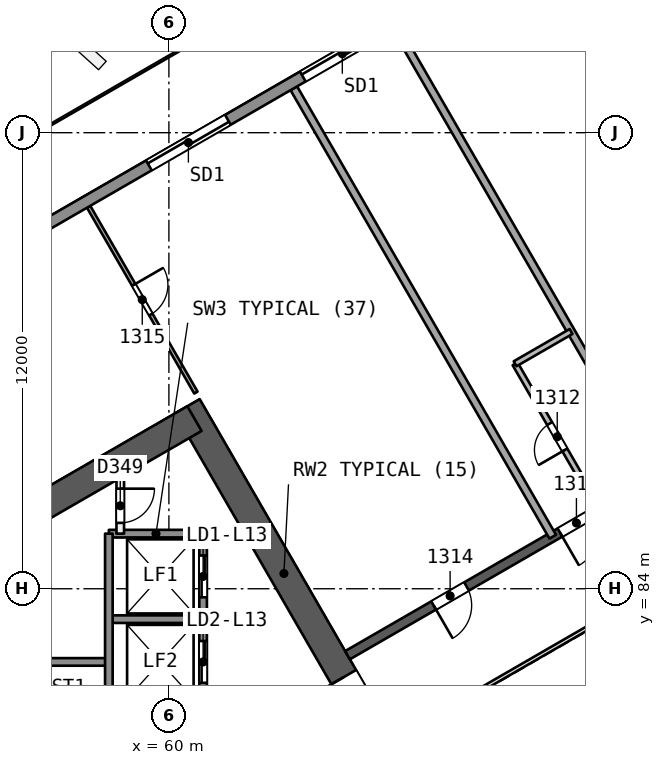
"""IFC4 building model, lengths in metres.
Left out: names, types, materials, properties, quantities, classifications, styles, units other than length and angle.
Written with IfcOpenShell. Run it as: python <this file> out.ifc"""

import sys

from ifc_helpers import new_model, si_unit, direction, frame, frame_2d, origin, place, context, subcontext, project, spatial, rectangle, extrude, element, fill, save


model = new_model("IFC4")
c1 = context("Model", 3, precision=1e-05, world=origin(), true_north=direction((0.0, 1.0)))
c2 = subcontext(c1, "Body", "Model", "MODEL_VIEW")
j1 = project(units=[si_unit("LENGTHUNIT", "METRE"), si_unit("PLANEANGLEUNIT", "RADIAN")], contexts=[c1])
p1 = place(None, origin())
s1 = spatial("IfcSite", under=j1, at=p1, CompositionType="ELEMENT")
p2 = place(p1, origin())
s2 = spatial("IfcBuilding", under=s1, at=p2, CompositionType="ELEMENT")
p3 = place(p2, frame((0.0, 0.0, 61.0)))
s3 = spatial("IfcBuildingStorey", under=s2, at=p3, CompositionType="ELEMENT", Elevation=61.0)
p4 = place(p3, frame((65.567, 80.0, 0.0), z_axis=(0.0, 0.0, 1.0), x_axis=(-0.499988615364, 0.866031976607, 0.0)))
e1 = element("IfcWall", 1, at=p4, inside=s3, PredefinedType="SHEAR", context=c2, shape_type="SweptSolid", body=[
    extrude(rectangle(XDim=10.163, YDim=0.75, at=frame_2d((5.082, 0.0))), origin(), (0.0, 0.0, 1.0), 3.7),
])
p5 = place(p4, frame((0.733, 0.0, 0.0)))
e2 = element("IfcOpeningElement", 2, at=p5, cuts=e1, PredefinedType="OPENING", context=c2, shape_type="SweptSolid", body=[
    extrude(rectangle(XDim=1.2, YDim=2.1, at=frame_2d((0.6, 1.05))), frame((0.0, 0.385, 0.0), z_axis=(0.0, -1.0, 0.0), x_axis=(1.0, 0.0, 0.0)), (0.0, 0.0, 1.0), 0.771),
])
p6 = place(p3, frame((60.673, 88.477, 0.0), z_axis=(0.0, 0.0, 1.0), x_axis=(-0.8660248072, -0.500001033313, 0.0)))
e3 = element("IfcWall", 3, at=p6, inside=s3, PredefinedType="SHEAR", context=c2, shape_type="SweptSolid", body=[
    extrude(rectangle(XDim=13.958, YDim=0.75, at=frame_2d((6.979, 0.0))), origin(), (0.0, 0.0, 1.0), 3.7),
])
p7 = place(p3, frame((78.2, 90.046, 0.0), z_axis=(0.0, 0.0, 1.0), x_axis=(-0.866026492143, -0.499998114903, 0.0)))
e4 = element("IfcWall", 4, at=p7, inside=s3, PredefinedType="SHEAR", context=c2, shape_type="SweptSolid", body=[
    extrude(rectangle(XDim=15.588, YDim=0.25, at=frame_2d((7.794, 0.0))), origin(), (0.0, 0.0, 1.0), 3.2),
])
p8 = place(p7, frame((2.618, 0.0, 0.0)))
e5 = element("IfcOpeningElement", 5, at=p8, cuts=e4, PredefinedType="OPENING", context=c2, shape_type="SweptSolid", body=[
    extrude(rectangle(XDim=1.0, YDim=2.1, at=frame_2d((0.5, 1.05))), frame((0.0, 0.135, 0.0), z_axis=(0.0, -1.0, 0.0), x_axis=(1.0, 0.0, 0.0)), (0.0, 0.0, 1.0), 0.271),
])
p9 = place(p7, frame((8.133, 0.0, 0.0)))
e6 = element("IfcOpeningElement", 6, at=p9, cuts=e4, PredefinedType="OPENING", context=c2, shape_type="SweptSolid", body=[
    extrude(rectangle(XDim=1.0, YDim=2.1, at=frame_2d((0.5, 1.05))), frame((0.0, 0.135, 0.0), z_axis=(0.0, -1.0, 0.0), x_axis=(1.0, 0.0, 0.0)), (0.0, 0.0, 1.0), 0.271),
])
p10 = place(p7, frame((11.971, 0.0, 0.0)))
e7 = element("IfcOpeningElement", 7, at=p10, cuts=e4, PredefinedType="OPENING", context=c2, shape_type="SweptSolid", body=[
    extrude(rectangle(XDim=1.0, YDim=2.1, at=frame_2d((0.5, 1.05))), frame((0.0, 0.135, 0.0), z_axis=(0.0, -1.0, 0.0), x_axis=(1.0, 0.0, 0.0)), (0.0, 0.0, 1.0), 0.271),
])
p11 = place(p3, frame((65.988, 98.728, 0.0), z_axis=(0.0, 0.0, 1.0), x_axis=(0.49999337185, -0.866029230515, 0.0)))
e8 = element("IfcWall", 8, at=p11, inside=s3, PredefinedType="PARTITIONING", context=c2, shape_type="SweptSolid", body=[
    extrude(rectangle(XDim=13.625, YDim=0.2, at=frame_2d((6.812, 0.0))), origin(), (0.0, 0.0, 1.0), 3.2),
])
p12 = place(p3, frame((71.328, 86.078, 0.0), z_axis=(0.0, 0.0, 1.0), x_axis=(-0.499981348214, 0.86603617213, 0.0)))
e9 = element("IfcWall", 9, at=p12, inside=s3, PredefinedType="PARTITIONING", context=c2, shape_type="SweptSolid", body=[
    extrude(rectangle(XDim=4.435, YDim=0.15, at=frame_2d((2.218, 0.0))), origin(), (0.0, 0.0, 1.0), 3.2),
])
p13 = place(p12, frame((1.818, 0.0, 0.0)))
e10 = element("IfcOpeningElement", 10, at=p13, cuts=e9, PredefinedType="OPENING", context=c2, shape_type="SweptSolid", body=[
    extrude(rectangle(XDim=0.8, YDim=2.1, at=frame_2d((0.4, 1.05))), frame((0.0, 0.085, 0.0), z_axis=(0.0, -1.0, 0.0), x_axis=(1.0, 0.0, 0.0)), (0.0, 0.0, 1.0), 0.171),
])
p14 = place(p3, frame((69.11, 89.919, 0.0), z_axis=(0.0, 0.0, 1.0), x_axis=(0.865989465428, 0.500062241894, 0.0)))
e11 = element("IfcWall", 11, at=p14, inside=s3, PredefinedType="PARTITIONING", context=c2, shape_type="SweptSolid", body=[
    extrude(rectangle(XDim=1.7, YDim=0.15, at=frame_2d((0.85, 0.0))), origin(), (0.0, 0.0, 1.0), 3.2),
])
p15 = place(p3, frame((63.287, 97.169, 0.0), z_axis=(0.0, 0.0, 1.0), x_axis=(0.500006810544, -0.866021471679, 0.0)))
e12 = element("IfcWall", 12, at=p15, inside=s3, PredefinedType="PARTITIONING", context=c2, shape_type="SweptSolid", body=[
    extrude(rectangle(XDim=13.625, YDim=0.2, at=frame_2d((6.812, 0.0))), origin(), (0.0, 0.0, 1.0), 3.2),
])
p16 = place(p3, frame((57.887, 94.051, 0.0), z_axis=(0.0, 0.0, 1.0), x_axis=(0.49999444814, -0.866028609128, 0.0)))
e13 = element("IfcWall", 13, at=p16, inside=s3, PredefinedType="PARTITIONING", context=c2, shape_type="SweptSolid", body=[
    extrude(rectangle(XDim=5.646, YDim=0.1, at=frame_2d((2.823, 0.0))), origin(), (0.0, 0.0, 1.0), 3.2),
])
p17 = place(p16, frame((2.373, 0.0, 0.0)))
e14 = element("IfcOpeningElement", 14, at=p17, cuts=e13, PredefinedType="OPENING", context=c2, shape_type="SweptSolid", body=[
    extrude(rectangle(XDim=0.9, YDim=2.1, at=frame_2d((0.45, 1.05))), frame((0.0, 0.061, 0.0), z_axis=(0.0, -1.0, 0.0), x_axis=(1.0, 0.0, 0.0)), (0.0, 0.0, 1.0), 0.121),
])
p18 = place(p3, frame((38.571, 83.071, 0.0), z_axis=(0.0, 0.0, 1.0), x_axis=(0.866024926003, 0.500000827541, 0.0)))
e15 = element("IfcWall", 15, at=p18, inside=s3, PredefinedType="SOLIDWALL", context=c2, shape_type="SweptSolid", body=[
    extrude(rectangle(XDim=60.025, YDim=0.3, at=frame_2d((30.013, 0.0))), origin(), (0.0, 0.0, 1.0), 3.2),
])
p19 = place(p18, frame((33.489, 0.0, 0.0)))
e16 = element("IfcOpeningElement", 16, at=p19, cuts=e15, PredefinedType="OPENING", context=c2, shape_type="SweptSolid", body=[
    extrude(rectangle(XDim=2.4, YDim=2.4, at=frame_2d((1.2, 1.2))), frame((0.0, 0.161, 0.0), z_axis=(0.0, -1.0, 0.0), x_axis=(1.0, 0.0, 0.0)), (0.0, 0.0, 1.0), 0.321),
])
p20 = place(p18, frame((46.558, 0.0, 0.0)))
e17 = element("IfcOpeningElement", 17, at=p20, cuts=e15, PredefinedType="OPENING", context=c2, shape_type="SweptSolid", body=[
    extrude(rectangle(XDim=2.4, YDim=2.4, at=frame_2d((1.2, 1.2))), frame((0.0, 0.161, 0.0), z_axis=(0.0, -1.0, 0.0), x_axis=(1.0, 0.0, 0.0)), (0.0, 0.0, 1.0), 0.321),
])
p21 = place(p18, frame((24.136, 0.0, 0.0)))
e18 = element("IfcOpeningElement", 18, at=p21, cuts=e15, PredefinedType="OPENING", context=c2, shape_type="SweptSolid", body=[
    extrude(rectangle(XDim=2.4, YDim=2.4, at=frame_2d((1.2, 1.2))), frame((0.0, 0.161, 0.0), z_axis=(0.0, -1.0, 0.0), x_axis=(1.0, 0.0, 0.0)), (0.0, 0.0, 1.0), 0.321),
])
p22 = place(p18, frame((11.109, 0.0, 0.0)))
e19 = element("IfcOpeningElement", 19, at=p22, cuts=e15, PredefinedType="OPENING", context=c2, shape_type="SweptSolid", body=[
    extrude(rectangle(XDim=2.4, YDim=2.4, at=frame_2d((1.2, 1.2))), frame((0.0, 0.161, 0.0), z_axis=(0.0, -1.0, 0.0), x_axis=(1.0, 0.0, 0.0)), (0.0, 0.0, 1.0), 0.321),
])
p23 = place(p18, frame((28.813, 0.0, 0.0)))
e20 = element("IfcOpeningElement", 20, at=p23, cuts=e15, PredefinedType="OPENING", context=c2, shape_type="SweptSolid", body=[
    extrude(rectangle(XDim=2.4, YDim=2.4, at=frame_2d((1.2, 1.2))), frame((0.0, 0.161, 0.0), z_axis=(0.0, -1.0, 0.0), x_axis=(1.0, 0.0, 0.0)), (0.0, 0.0, 1.0), 0.321),
])
for number, where, z_axis, x_axis in (
    (21, (60.9, 85.45, 0.0), (0.0, 0.0, 1.0), (-1.0, 0.0, 0.0)),
    (22, (60.9, 83.2, 0.0), (0.0, 0.0, 1.0), (-1.0, 0.0, 0.0)),
):
    element("IfcWall", number, at=place(p3, frame(where, z_axis=z_axis, x_axis=x_axis)), inside=s3, PredefinedType="SOLIDWALL", context=c2, shape_type="SweptSolid", body=[
        extrude(rectangle(XDim=2.48, YDim=0.2, at=frame_2d((1.24, 0.0))), origin(), (0.0, 0.0, 1.0), 3.2),
    ])
p24 = place(p3, frame((58.42, 82.075, 0.0), z_axis=(0.0, 0.0, 1.0), x_axis=(-1.0, 0.0, 0.0)))
e23 = element("IfcWall", 23, at=p24, inside=s3, PredefinedType="SOLIDWALL", context=c2, shape_type="SweptSolid", body=[
    extrude(rectangle(XDim=7.7, YDim=0.2, at=frame_2d((3.85, 0.0))), origin(), (0.0, 0.0, 1.0), 3.2),
])
p25 = place(p3, frame((60.9, 85.45, 0.0), z_axis=(0.0, 0.0, 1.0), x_axis=(0.0, -1.0, 0.0)))
e24 = element("IfcWall", 24, at=p25, inside=s3, PredefinedType="SOLIDWALL", context=c2, shape_type="SweptSolid", body=[
    extrude(rectangle(XDim=10.9, YDim=0.2, at=frame_2d((5.45, 0.0))), origin(), (0.0, 0.0, 1.0), 3.2),
])
p26 = place(p25, frame((0.575, 0.0, 0.0)))
e25 = element("IfcOpeningElement", 25, at=p26, cuts=e24, PredefinedType="OPENING", context=c2, shape_type="SweptSolid", body=[
    extrude(rectangle(XDim=1.1, YDim=2.1, at=frame_2d((0.55, 1.05))), frame((0.0, 0.11, 0.0), z_axis=(0.0, -1.0, 0.0), x_axis=(1.0, 0.0, 0.0)), (0.0, 0.0, 1.0), 0.221),
])
p27 = place(p25, frame((2.825, 0.0, 0.0)))
e26 = element("IfcOpeningElement", 26, at=p27, cuts=e24, PredefinedType="OPENING", context=c2, shape_type="SweptSolid", body=[
    extrude(rectangle(XDim=1.1, YDim=2.1, at=frame_2d((0.55, 1.05))), frame((0.0, 0.11, 0.0), z_axis=(0.0, -1.0, 0.0), x_axis=(1.0, 0.0, 0.0)), (0.0, 0.0, 1.0), 0.221),
])
p28 = place(p25, frame((5.075, 0.0, 0.0)))
e27 = element("IfcOpeningElement", 27, at=p28, cuts=e24, PredefinedType="OPENING", context=c2, shape_type="SweptSolid", body=[
    extrude(rectangle(XDim=1.1, YDim=2.1, at=frame_2d((0.55, 1.05))), frame((0.0, 0.11, 0.0), z_axis=(0.0, -1.0, 0.0), x_axis=(1.0, 0.0, 0.0)), (0.0, 0.0, 1.0), 0.221),
])
p29 = place(p25, frame((7.325, 0.0, 0.0)))
e28 = element("IfcOpeningElement", 28, at=p29, cuts=e24, PredefinedType="OPENING", context=c2, shape_type="SweptSolid", body=[
    extrude(rectangle(XDim=1.1, YDim=2.1, at=frame_2d((0.55, 1.05))), frame((0.0, 0.11, 0.0), z_axis=(0.0, -1.0, 0.0), x_axis=(1.0, 0.0, 0.0)), (0.0, 0.0, 1.0), 0.221),
])
p30 = place(p3, frame((58.72, 86.917, 0.0), z_axis=(0.0, 0.0, 1.0), x_axis=(0.0, -1.0, 0.0)))
e29 = element("IfcWall", 29, at=p30, inside=s3, PredefinedType="PARTITIONING", context=c2, shape_type="SweptSolid", body=[
    extrude(rectangle(XDim=1.467, YDim=0.2, at=frame_2d((0.733, 0.0))), origin(), (0.0, 0.0, 1.0), 3.2),
])
p31 = place(p30, frame((0.283, 0.0, 0.0)))
e30 = element("IfcOpeningElement", 30, at=p31, cuts=e29, PredefinedType="OPENING", context=c2, shape_type="SweptSolid", body=[
    extrude(rectangle(XDim=0.9, YDim=2.1, at=frame_2d((0.45, 1.05))), frame((0.0, 0.11, 0.0), z_axis=(0.0, -1.0, 0.0), x_axis=(1.0, 0.0, 0.0)), (0.0, 0.0, 1.0), 0.221),
])
p32 = place(p3, frame((58.42, 85.45, 0.0), z_axis=(0.0, 0.0, 1.0), x_axis=(0.0, -1.0, 0.0)))
e31 = element("IfcWall", 31, at=p32, inside=s3, PredefinedType="SOLIDWALL", context=c2, shape_type="SweptSolid", body=[
    extrude(rectangle(XDim=9.0, YDim=0.2, at=frame_2d((4.5, 0.0))), origin(), (0.0, 0.0, 1.0), 3.2),
])
p33 = place(p3, frame((77.738, 86.846, 0.0), z_axis=(0.0, 0.0, 1.0), x_axis=(-0.866026658274, -0.499997827154, 0.0)))
e32 = element("IfcWall", 32, at=p33, inside=s3, PredefinedType="PARTITIONING", context=c2, shape_type="SweptSolid", body=[
    extrude(rectangle(XDim=11.588, YDim=0.1, at=frame_2d((5.794, 0.0))), origin(), (0.0, 0.0, 1.0), 3.2),
])
p34 = place(p13, origin())
e33 = element("IfcDoor", 33, at=p34, inside=s3, OperationType="SINGLE_SWING_LEFT", PredefinedType="NOTDEFINED", context=c2, shape_type="SweptSolid", body=[
    extrude(rectangle(XDim=0.8, YDim=2.1, at=frame_2d((0.4, 1.05))), frame((0.0, 0.025, 0.0), z_axis=(0.0, -1.0, 0.0), x_axis=(1.0, 0.0, 0.0)), (0.0, 0.0, 1.0), 0.05),
])
fill(e10, e33)
p35 = place(p9, origin())
e34 = element("IfcDoor", 34, at=p35, inside=s3, OperationType="SINGLE_SWING_RIGHT", PredefinedType="NOTDEFINED", context=c2, shape_type="SweptSolid", body=[
    extrude(rectangle(XDim=1.0, YDim=2.1, at=frame_2d((0.5, 1.05))), frame((0.0, 0.025, 0.0), z_axis=(0.0, -1.0, 0.0), x_axis=(1.0, 0.0, 0.0)), (0.0, 0.0, 1.0), 0.05),
])
fill(e6, e34)
p36 = place(p10, origin())
e35 = element("IfcDoor", 35, at=p36, inside=s3, OperationType="SINGLE_SWING_RIGHT", PredefinedType="NOTDEFINED", context=c2, shape_type="SweptSolid", body=[
    extrude(rectangle(XDim=1.0, YDim=2.1, at=frame_2d((0.5, 1.05))), frame((0.0, 0.025, 0.0), z_axis=(0.0, -1.0, 0.0), x_axis=(1.0, 0.0, 0.0)), (0.0, 0.0, 1.0), 0.05),
])
fill(e7, e35)
p37 = place(p17, origin())
e36 = element("IfcDoor", 36, at=p37, inside=s3, OperationType="SINGLE_SWING_LEFT", PredefinedType="NOTDEFINED", context=c2, shape_type="SweptSolid", body=[
    extrude(rectangle(XDim=0.9, YDim=2.1, at=frame_2d((0.45, 1.05))), frame((0.0, 0.025, 0.0), z_axis=(0.0, -1.0, 0.0), x_axis=(1.0, 0.0, 0.0)), (0.0, 0.0, 1.0), 0.05),
])
fill(e14, e36)
p38 = place(p21, origin())
e37 = element("IfcDoor", 37, at=p38, inside=s3, OperationType="SLIDING_TO_LEFT", PredefinedType="NOTDEFINED", context=c2, shape_type="SweptSolid", body=[
    extrude(rectangle(XDim=2.4, YDim=2.4, at=frame_2d((1.2, 1.2))), frame((0.0, 0.025, 0.0), z_axis=(0.0, -1.0, 0.0), x_axis=(1.0, 0.0, 0.0)), (0.0, 0.0, 1.0), 0.05),
])
fill(e18, e37)
p39 = place(p23, origin())
e38 = element("IfcDoor", 38, at=p39, inside=s3, OperationType="SLIDING_TO_LEFT", PredefinedType="NOTDEFINED", context=c2, shape_type="SweptSolid", body=[
    extrude(rectangle(XDim=2.4, YDim=2.4, at=frame_2d((1.2, 1.2))), frame((0.0, 0.025, 0.0), z_axis=(0.0, -1.0, 0.0), x_axis=(1.0, 0.0, 0.0)), (0.0, 0.0, 1.0), 0.05),
])
fill(e20, e38)
p40 = place(p5, origin())
e39 = element("IfcDoor", 39, at=p40, inside=s3, OperationType="SINGLE_SWING_RIGHT", PredefinedType="NOTDEFINED", context=c2, shape_type="SweptSolid", body=[
    extrude(rectangle(XDim=1.2, YDim=2.1, at=frame_2d((0.6, 1.05))), frame((0.0, 0.025, 0.0), z_axis=(0.0, -1.0, 0.0), x_axis=(1.0, 0.0, 0.0)), (0.0, 0.0, 1.0), 0.05),
])
fill(e2, e39)
p41 = place(p26, origin())
e40 = element("IfcDoor", 40, at=p41, inside=s3, OperationType="SLIDING_TO_RIGHT", PredefinedType="NOTDEFINED", context=c2, shape_type="SweptSolid", body=[
    extrude(rectangle(XDim=1.1, YDim=2.1, at=frame_2d((0.55, 1.05))), frame((0.0, 0.025, 0.0), z_axis=(0.0, -1.0, 0.0), x_axis=(1.0, 0.0, 0.0)), (0.0, 0.0, 1.0), 0.05),
])
fill(e25, e40)
p42 = place(p27, origin())
e41 = element("IfcDoor", 41, at=p42, inside=s3, OperationType="SLIDING_TO_LEFT", PredefinedType="NOTDEFINED", context=c2, shape_type="SweptSolid", body=[
    extrude(rectangle(XDim=1.1, YDim=2.1, at=frame_2d((0.55, 1.05))), frame((0.0, 0.025, 0.0), z_axis=(0.0, -1.0, 0.0), x_axis=(1.0, 0.0, 0.0)), (0.0, 0.0, 1.0), 0.05),
])
fill(e26, e41)
p43 = place(p31, origin())
e42 = element("IfcDoor", 42, at=p43, inside=s3, OperationType="SINGLE_SWING_LEFT", PredefinedType="NOTDEFINED", context=c2, shape_type="SweptSolid", body=[
    extrude(rectangle(XDim=0.9, YDim=2.1, at=frame_2d((0.45, 1.05))), frame((0.0, 0.025, 0.0), z_axis=(0.0, -1.0, 0.0), x_axis=(1.0, 0.0, 0.0)), (0.0, 0.0, 1.0), 0.05),
])
fill(e30, e42)
save(model, sys.argv[1])
